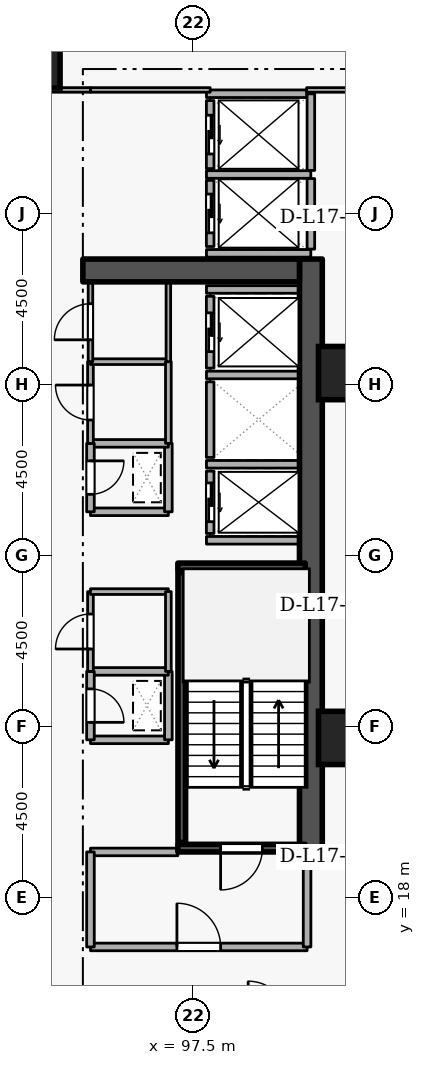
"""IFC4 building model, lengths in metres.
Left out: names, types, materials, properties, quantities, classifications, styles, units other than length and angle.
Written with IfcOpenShell. Run it as: python <this file> out.ifc"""

import sys

from ifc_helpers import new_model, si_unit, direction, frame, frame_2d, origin, origin_2d, place, context, subcontext, project, spatial, rectangle, extrude, element, fill, save


model = new_model("IFC4")
c1 = context("Model", 3, precision=1e-05, world=origin(), true_north=direction((0.0, 1.0)))
c2 = subcontext(c1, "Body", "Model", "MODEL_VIEW")
j1 = project(units=[si_unit("LENGTHUNIT", "METRE"), si_unit("PLANEANGLEUNIT", "RADIAN")], contexts=[c1])
p1 = place(None, origin())
s1 = spatial("IfcSite", under=j1, at=p1, CompositionType="ELEMENT")
p2 = place(p1, origin())
s2 = spatial("IfcBuilding", under=s1, at=p2, CompositionType="ELEMENT")
p3 = place(p2, frame((0.0, 0.0, 68.1)))
s3 = spatial("IfcBuildingStorey", under=s2, at=p3, CompositionType="ELEMENT", Elevation=68.1)
p4 = place(p3, frame((100.6, 19.2, 0.0), z_axis=(0.0, 0.0, 1.0), x_axis=(0.0, 1.0, 0.0)))
e1 = element("IfcWall", 1, at=p4, inside=s3, PredefinedType="SHEAR", context=c2, shape_type="SweptSolid", body=[
    extrude(rectangle(XDim=15.6, YDim=0.6, at=frame_2d((7.8, 0.0))), origin(), (0.0, 0.0, 1.0), 3.6),
])
p5 = place(p3, frame((94.6, 34.5, 0.0), z_axis=(0.0, 0.0, 1.0), x_axis=(1.0, 0.0, 0.0)))
e2 = element("IfcWall", 2, at=p5, inside=s3, PredefinedType="SHEAR", context=c2, shape_type="SweptSolid", body=[
    extrude(rectangle(XDim=5.7, YDim=0.6, at=frame_2d((2.85, 0.0))), origin(), (0.0, 0.0, 1.0), 3.6),
])
for number, where, z_axis, x_axis in (
    (3, (93.3, 40.0, 0.0), (0.0, 0.0, 1.0), (1.0, 0.0, 0.0)),
    (4, (101.5, 22.2, 0.0), (0.0, 0.0, 1.0), (1.0, 0.0, 0.0)),
    (5, (101.5, 31.8, 0.0), (0.0, 0.0, 1.0), (1.0, 0.0, 0.0)),
):
    element("IfcColumn", number, at=place(p3, frame(where, z_axis=z_axis, x_axis=x_axis)), inside=s3, PredefinedType="COLUMN", context=c2, shape_type="SweptSolid", body=[
        extrude(rectangle(XDim=1.4, YDim=1.4, at=origin_2d()), origin(), (0.0, 0.0, 1.0), 3.6),
    ])
p6 = place(p3, frame((97.95, 29.22, 0.0), z_axis=(0.0, 0.0, 1.0), x_axis=(0.0, -1.0, 0.0)))
e6 = element("IfcWall", 6, at=p6, inside=s3, PredefinedType="STANDARD", context=c2, shape_type="SweptSolid", body=[
    extrude(rectangle(XDim=1.64, YDim=0.2, at=frame_2d((0.82, 0.0))), origin(), (0.0, 0.0, 1.0), 3.26),
])
p7 = place(p6, frame((0.31, 0.0, 0.0)))
e7 = element("IfcOpeningElement", 7, at=p7, cuts=e6, PredefinedType="OPENING", context=c2, shape_type="SweptSolid", body=[
    extrude(rectangle(XDim=1.02, YDim=2.06, at=frame_2d((0.51, 1.03))), frame((0.0, 0.11, 0.0), z_axis=(0.0, -1.0, 0.0), x_axis=(1.0, 0.0, 0.0)), (0.0, 0.0, 1.0), 0.22),
])
p8 = place(p3, frame((97.95, 31.57, 0.0), z_axis=(0.0, 0.0, 1.0), x_axis=(0.0, -1.0, 0.0)))
e8 = element("IfcWall", 8, at=p8, inside=s3, PredefinedType="STANDARD", context=c2, shape_type="SweptSolid", body=[
    extrude(rectangle(XDim=1.99, YDim=0.2, at=frame_2d((0.995, 0.0))), origin(), (0.0, 0.0, 1.0), 3.26),
])
p9 = place(p3, frame((97.95, 33.82, 0.0), z_axis=(0.0, 0.0, 1.0), x_axis=(0.0, -1.0, 0.0)))
e9 = element("IfcWall", 9, at=p9, inside=s3, PredefinedType="STANDARD", context=c2, shape_type="SweptSolid", body=[
    extrude(rectangle(XDim=1.89, YDim=0.2, at=frame_2d((0.945, 0.0))), origin(), (0.0, 0.0, 1.0), 3.26),
])
p10 = place(p9, frame((0.435, 0.0, 0.0)))
e10 = element("IfcOpeningElement", 10, at=p10, cuts=e9, PredefinedType="OPENING", context=c2, shape_type="SweptSolid", body=[
    extrude(rectangle(XDim=1.02, YDim=2.06, at=frame_2d((0.51, 1.03))), frame((0.0, 0.11, 0.0), z_axis=(0.0, -1.0, 0.0), x_axis=(1.0, 0.0, 0.0)), (0.0, 0.0, 1.0), 0.22),
])
p11 = place(p3, frame((97.95, 36.87, 0.0), z_axis=(0.0, 0.0, 1.0), x_axis=(0.0, -1.0, 0.0)))
e11 = element("IfcWall", 11, at=p11, inside=s3, PredefinedType="STANDARD", context=c2, shape_type="SweptSolid", body=[
    extrude(rectangle(XDim=1.74, YDim=0.2, at=frame_2d((0.87, 0.0))), origin(), (0.0, 0.0, 1.0), 3.26),
])
p12 = place(p11, frame((0.36, 0.0, 0.0)))
e12 = element("IfcOpeningElement", 12, at=p12, cuts=e11, PredefinedType="OPENING", context=c2, shape_type="SweptSolid", body=[
    extrude(rectangle(XDim=1.02, YDim=2.06, at=frame_2d((0.51, 1.03))), frame((0.0, 0.11, 0.0), z_axis=(0.0, -1.0, 0.0), x_axis=(1.0, 0.0, 0.0)), (0.0, 0.0, 1.0), 0.22),
])
p13 = place(p3, frame((97.95, 38.97, 0.0), z_axis=(0.0, 0.0, 1.0), x_axis=(0.0, -1.0, 0.0)))
e13 = element("IfcWall", 13, at=p13, inside=s3, PredefinedType="STANDARD", context=c2, shape_type="SweptSolid", body=[
    extrude(rectangle(XDim=1.79, YDim=0.2, at=frame_2d((0.895, 0.0))), origin(), (0.0, 0.0, 1.0), 3.26),
])
p14 = place(p13, frame((0.385, 0.0, 0.0)))
e14 = element("IfcOpeningElement", 14, at=p14, cuts=e13, PredefinedType="OPENING", context=c2, shape_type="SweptSolid", body=[
    extrude(rectangle(XDim=1.02, YDim=2.06, at=frame_2d((0.51, 1.03))), frame((0.0, 0.11, 0.0), z_axis=(0.0, -1.0, 0.0), x_axis=(1.0, 0.0, 0.0)), (0.0, 0.0, 1.0), 0.22),
])
for number, where, z_axis, x_axis in (
    (15, (97.852, 29.4, 0.0), (0.0, 0.0, 1.0), (1.0, 0.0, 0.0)),
    (16, (97.852, 27.4, 0.0), (0.0, 0.0, 1.0), (1.0, 0.0, 0.0)),
    (17, (97.852, 31.75, 0.0), (0.0, 0.0, 1.0), (1.0, 0.0, 0.0)),
    (18, (97.852, 34.0, 0.0), (0.0, 0.0, 1.0), (1.0, 0.0, 0.0)),
):
    element("IfcWall", number, at=place(p3, frame(where, z_axis=z_axis, x_axis=x_axis)), inside=s3, PredefinedType="STANDARD", context=c2, shape_type="SweptSolid", body=[
        extrude(rectangle(XDim=2.436, YDim=0.2, at=frame_2d((1.218, 0.0))), origin(), (0.0, 0.0, 1.0), 3.26),
    ])
for number, where, z_axis, x_axis in (
    (19, (97.852, 37.025, 0.0), (0.0, 0.0, 1.0), (1.0, 0.0, 0.0)),
    (20, (97.852, 34.95, 0.0), (0.0, 0.0, 1.0), (1.0, 0.0, 0.0)),
):
    element("IfcWall", number, at=place(p3, frame(where, z_axis=z_axis, x_axis=x_axis)), inside=s3, PredefinedType="STANDARD", context=c2, shape_type="SweptSolid", body=[
        extrude(rectangle(XDim=2.746, YDim=0.2, at=frame_2d((1.373, 0.0))), origin(), (0.0, 0.0, 1.0), 3.26),
    ])
p15 = place(p3, frame((100.6, 35.062, 0.0), z_axis=(0.0, 0.0, 1.0), x_axis=(0.0, 1.0, 0.0)))
e21 = element("IfcWall", 21, at=p15, inside=s3, PredefinedType="STANDARD", context=c2, shape_type="SweptSolid", body=[
    extrude(rectangle(XDim=1.856, YDim=0.2, at=frame_2d((0.928, 0.0))), origin(), (0.0, 0.0, 1.0), 3.26),
])
p16 = place(p3, frame((100.6, 37.132, 0.0), z_axis=(0.0, 0.0, 1.0), x_axis=(0.0, 1.0, 0.0)))
e22 = element("IfcWall", 22, at=p16, inside=s3, PredefinedType="STANDARD", context=c2, shape_type="SweptSolid", body=[
    extrude(rectangle(XDim=2.016, YDim=0.2, at=frame_2d((1.008, 0.0))), origin(), (0.0, 0.0, 1.0), 3.26),
])
p17 = place(p3, frame((97.852, 39.15, 0.0), z_axis=(0.0, 0.0, 1.0), x_axis=(1.0, 0.0, 0.0)))
e23 = element("IfcWall", 23, at=p17, inside=s3, PredefinedType="STANDARD", context=c2, shape_type="SweptSolid", body=[
    extrude(rectangle(XDim=2.636, YDim=0.2, at=frame_2d((1.318, 0.0))), origin(), (0.0, 0.0, 1.0), 3.26),
])
p18 = place(p3, frame((100.45, 19.3, 0.0), z_axis=(0.0, 0.0, 1.0), x_axis=(-1.0, 0.0, 0.0)))
e24 = element("IfcWall", 24, at=p18, inside=s3, PredefinedType="SHEAR", context=c2, shape_type="SweptSolid", body=[
    extrude(rectangle(XDim=3.35, YDim=0.2, at=frame_2d((1.675, 0.0))), origin(), (0.0, 0.0, 1.0), 3.6),
])
p19 = place(p18, frame((1.125, 0.0, 0.0)))
e25 = element("IfcOpeningElement", 25, at=p19, cuts=e24, PredefinedType="OPENING", context=c2, shape_type="SweptSolid", body=[
    extrude(rectangle(XDim=1.1, YDim=2.1, at=frame_2d((0.55, 1.05))), frame((0.0, 0.11, 0.0), z_axis=(0.0, -1.0, 0.0), x_axis=(1.0, 0.0, 0.0)), (0.0, 0.0, 1.0), 0.22),
])
p20 = place(p3, frame((97.1, 26.7, 0.0), z_axis=(0.0, 0.0, 1.0), x_axis=(1.0, 0.0, 0.0)))
e26 = element("IfcWall", 26, at=p20, inside=s3, PredefinedType="SHEAR", context=c2, shape_type="SweptSolid", body=[
    extrude(rectangle(XDim=3.35, YDim=0.2, at=frame_2d((1.675, 0.0))), origin(), (0.0, 0.0, 1.0), 3.6),
])
p21 = place(p3, frame((97.203, 26.55, 0.0), z_axis=(0.0, 0.0, 1.0), x_axis=(0.0, -1.0, 0.0)))
e27 = element("IfcWall", 27, at=p21, inside=s3, PredefinedType="SHEAR", context=c2, shape_type="SweptSolid", body=[
    extrude(rectangle(XDim=7.1, YDim=0.2, at=frame_2d((3.55, 0.0))), origin(), (0.0, 0.0, 1.0), 3.6),
])
p22 = place(p3, frame((94.8, 16.7, 0.0), z_axis=(0.0, 0.0, 1.0), x_axis=(1.0, 0.0, 0.0)))
e28 = element("IfcWall", 28, at=p22, inside=s3, PredefinedType="STANDARD", context=c2, shape_type="SweptSolid", body=[
    extrude(rectangle(XDim=5.7, YDim=0.2, at=frame_2d((2.85, 0.0))), origin(), (0.0, 0.0, 1.0), 3.26),
])
p23 = place(p22, frame((2.275, 0.0, 0.0)))
e29 = element("IfcOpeningElement", 29, at=p23, cuts=e28, PredefinedType="OPENING", context=c2, shape_type="SweptSolid", body=[
    extrude(rectangle(XDim=1.15, YDim=2.1, at=frame_2d((0.575, 1.05))), frame((0.0, 0.11, 0.0), z_axis=(0.0, -1.0, 0.0), x_axis=(1.0, 0.0, 0.0)), (0.0, 0.0, 1.0), 0.22),
])
p24 = place(p3, frame((100.5, 16.7, 0.0), z_axis=(0.0, 0.0, 1.0), x_axis=(0.0, 1.0, 0.0)))
e30 = element("IfcWall", 30, at=p24, inside=s3, PredefinedType="STANDARD", context=c2, shape_type="SweptSolid", body=[
    extrude(rectangle(XDim=2.5, YDim=0.2, at=frame_2d((1.25, 0.0))), origin(), (0.0, 0.0, 1.0), 3.26),
])
p25 = place(p3, frame((97.1, 19.2, 0.0), z_axis=(0.0, 0.0, 1.0), x_axis=(-1.0, 0.0, 0.0)))
e31 = element("IfcWall", 31, at=p25, inside=s3, PredefinedType="STANDARD", context=c2, shape_type="SweptSolid", body=[
    extrude(rectangle(XDim=2.3, YDim=0.2, at=frame_2d((1.15, 0.0))), origin(), (0.0, 0.0, 1.0), 2.465),
])
p26 = place(p3, frame((94.8, 19.2, 0.0), z_axis=(0.0, 0.0, 1.0), x_axis=(0.0, -1.0, 0.0)))
e32 = element("IfcWall", 32, at=p26, inside=s3, PredefinedType="STANDARD", context=c2, shape_type="SweptSolid", body=[
    extrude(rectangle(XDim=2.5, YDim=0.2, at=frame_2d((1.25, 0.0))), origin(), (0.0, 0.0, 1.0), 3.26),
])
p27 = place(p3, frame((94.8, 28.15, 0.0), z_axis=(0.0, 0.0, 1.0), x_axis=(1.0, 0.0, 0.0)))
e33 = element("IfcWall", 33, at=p27, inside=s3, PredefinedType="STANDARD", context=c2, shape_type="SweptSolid", body=[
    extrude(rectangle(XDim=2.05, YDim=0.2, at=frame_2d((1.025, 0.0))), origin(), (0.0, 0.0, 1.0), 3.26),
])
p28 = place(p3, frame((96.85, 28.15, 0.0), z_axis=(0.0, 0.0, 1.0), x_axis=(0.0, 1.0, 0.0)))
e34 = element("IfcWall", 34, at=p28, inside=s3, PredefinedType="STANDARD", context=c2, shape_type="SweptSolid", body=[
    extrude(rectangle(XDim=1.8, YDim=0.2, at=frame_2d((0.9, 0.0))), origin(), (0.0, 0.0, 1.0), 3.26),
])
p29 = place(p3, frame((96.85, 29.95, 0.0), z_axis=(0.0, 0.0, 1.0), x_axis=(-1.0, 0.0, 0.0)))
e35 = element("IfcWall", 35, at=p29, inside=s3, PredefinedType="STANDARD", context=c2, shape_type="SweptSolid", body=[
    extrude(rectangle(XDim=2.05, YDim=0.2, at=frame_2d((1.025, 0.0))), origin(), (0.0, 0.0, 1.0), 3.26),
])
p30 = place(p3, frame((94.8, 29.95, 0.0), z_axis=(0.0, 0.0, 1.0), x_axis=(0.0, -1.0, 0.0)))
e36 = element("IfcWall", 36, at=p30, inside=s3, PredefinedType="STANDARD", context=c2, shape_type="SweptSolid", body=[
    extrude(rectangle(XDim=1.8, YDim=0.2, at=frame_2d((0.9, 0.0))), origin(), (0.0, 0.0, 1.0), 3.26),
])
p31 = place(p30, frame((0.46, 0.0, 0.0)))
e37 = element("IfcOpeningElement", 37, at=p31, cuts=e36, PredefinedType="OPENING", context=c2, shape_type="SweptSolid", body=[
    extrude(rectangle(XDim=0.88, YDim=2.04, at=frame_2d((0.44, 1.02))), frame((0.0, 0.11, 0.0), z_axis=(0.0, -1.0, 0.0), x_axis=(1.0, 0.0, 0.0)), (0.0, 0.0, 1.0), 0.22),
])
p32 = place(p3, frame((94.8, 22.15, 0.0), z_axis=(0.0, 0.0, 1.0), x_axis=(1.0, 0.0, 0.0)))
e38 = element("IfcWall", 38, at=p32, inside=s3, PredefinedType="STANDARD", context=c2, shape_type="SweptSolid", body=[
    extrude(rectangle(XDim=2.05, YDim=0.2, at=frame_2d((1.025, 0.0))), origin(), (0.0, 0.0, 1.0), 3.26),
])
p33 = place(p3, frame((96.85, 22.15, 0.0), z_axis=(0.0, 0.0, 1.0), x_axis=(0.0, 1.0, 0.0)))
e39 = element("IfcWall", 39, at=p33, inside=s3, PredefinedType="STANDARD", context=c2, shape_type="SweptSolid", body=[
    extrude(rectangle(XDim=1.8, YDim=0.2, at=frame_2d((0.9, 0.0))), origin(), (0.0, 0.0, 1.0), 3.26),
])
p34 = place(p3, frame((96.85, 23.95, 0.0), z_axis=(0.0, 0.0, 1.0), x_axis=(-1.0, 0.0, 0.0)))
e40 = element("IfcWall", 40, at=p34, inside=s3, PredefinedType="STANDARD", context=c2, shape_type="SweptSolid", body=[
    extrude(rectangle(XDim=2.05, YDim=0.2, at=frame_2d((1.025, 0.0))), origin(), (0.0, 0.0, 1.0), 3.26),
])
p35 = place(p3, frame((94.8, 23.95, 0.0), z_axis=(0.0, 0.0, 1.0), x_axis=(0.0, -1.0, 0.0)))
e41 = element("IfcWall", 41, at=p35, inside=s3, PredefinedType="STANDARD", context=c2, shape_type="SweptSolid", body=[
    extrude(rectangle(XDim=1.8, YDim=0.2, at=frame_2d((0.9, 0.0))), origin(), (0.0, 0.0, 1.0), 3.26),
])
p36 = place(p35, frame((0.46, 0.0, 0.0)))
e42 = element("IfcOpeningElement", 42, at=p36, cuts=e41, PredefinedType="OPENING", context=c2, shape_type="SweptSolid", body=[
    extrude(rectangle(XDim=0.88, YDim=2.04, at=frame_2d((0.44, 1.02))), frame((0.0, 0.11, 0.0), z_axis=(0.0, -1.0, 0.0), x_axis=(1.0, 0.0, 0.0)), (0.0, 0.0, 1.0), 0.22),
])
p37 = place(p3, frame((94.8, 23.95, 0.0), z_axis=(0.0, 0.0, 1.0), x_axis=(0.0, 1.0, 0.0)))
e43 = element("IfcWall", 43, at=p37, inside=s3, PredefinedType="PARTITIONING", context=c2, shape_type="SweptSolid", body=[
    extrude(rectangle(XDim=2.1, YDim=0.15, at=frame_2d((1.05, 0.0))), origin(), (0.0, 0.0, 1.0), 3.26),
])
p38 = place(p37, frame((0.59, 0.0, 0.0)))
e44 = element("IfcOpeningElement", 44, at=p38, cuts=e43, PredefinedType="OPENING", context=c2, shape_type="SweptSolid", body=[
    extrude(rectangle(XDim=0.92, YDim=2.08, at=frame_2d((0.46, 1.04))), frame((0.0, 0.085, 0.0), z_axis=(0.0, -1.0, 0.0), x_axis=(1.0, 0.0, 0.0)), (0.0, 0.0, 1.0), 0.17),
])
p39 = place(p3, frame((94.8, 26.05, 0.0), z_axis=(0.0, 0.0, 1.0), x_axis=(1.0, 0.0, 0.0)))
e45 = element("IfcWall", 45, at=p39, inside=s3, PredefinedType="PARTITIONING", context=c2, shape_type="SweptSolid", body=[
    extrude(rectangle(XDim=2.05, YDim=0.15, at=frame_2d((1.025, 0.0))), origin(), (0.0, 0.0, 1.0), 3.26),
])
p40 = place(p3, frame((96.85, 26.05, 0.0), z_axis=(0.0, 0.0, 1.0), x_axis=(0.0, -1.0, 0.0)))
e46 = element("IfcWall", 46, at=p40, inside=s3, PredefinedType="PARTITIONING", context=c2, shape_type="SweptSolid", body=[
    extrude(rectangle(XDim=2.1, YDim=0.15, at=frame_2d((1.05, 0.0))), origin(), (0.0, 0.0, 1.0), 3.26),
])
p41 = place(p3, frame((94.8, 29.95, 0.0), z_axis=(0.0, 0.0, 1.0), x_axis=(0.0, 1.0, 0.0)))
e47 = element("IfcWall", 47, at=p41, inside=s3, PredefinedType="PARTITIONING", context=c2, shape_type="SweptSolid", body=[
    extrude(rectangle(XDim=2.15, YDim=0.15, at=frame_2d((1.075, 0.0))), origin(), (0.0, 0.0, 1.0), 3.26),
])
p42 = place(p41, frame((0.615, 0.0, 0.0)))
e48 = element("IfcOpeningElement", 48, at=p42, cuts=e47, PredefinedType="OPENING", context=c2, shape_type="SweptSolid", body=[
    extrude(rectangle(XDim=0.92, YDim=2.08, at=frame_2d((0.46, 1.04))), frame((0.0, 0.085, 0.0), z_axis=(0.0, -1.0, 0.0), x_axis=(1.0, 0.0, 0.0)), (0.0, 0.0, 1.0), 0.17),
])
p43 = place(p3, frame((94.8, 32.1, 0.0), z_axis=(0.0, 0.0, 1.0), x_axis=(1.0, 0.0, 0.0)))
e49 = element("IfcWall", 49, at=p43, inside=s3, PredefinedType="PARTITIONING", context=c2, shape_type="SweptSolid", body=[
    extrude(rectangle(XDim=2.05, YDim=0.15, at=frame_2d((1.025, 0.0))), origin(), (0.0, 0.0, 1.0), 3.26),
])
p44 = place(p3, frame((96.85, 32.1, 0.0), z_axis=(0.0, 0.0, 1.0), x_axis=(0.0, -1.0, 0.0)))
e50 = element("IfcWall", 50, at=p44, inside=s3, PredefinedType="PARTITIONING", context=c2, shape_type="SweptSolid", body=[
    extrude(rectangle(XDim=2.15, YDim=0.15, at=frame_2d((1.075, 0.0))), origin(), (0.0, 0.0, 1.0), 3.26),
])
p45 = place(p3, frame((94.8, 32.1, 0.0), z_axis=(0.0, 0.0, 1.0), x_axis=(0.0, 1.0, 0.0)))
e51 = element("IfcWall", 51, at=p45, inside=s3, PredefinedType="PARTITIONING", context=c2, shape_type="SweptSolid", body=[
    extrude(rectangle(XDim=2.1, YDim=0.12, at=frame_2d((1.05, 0.0))), origin(), (0.0, 0.0, 1.0), 3.26),
])
p46 = place(p45, frame((0.575, 0.0, 0.0)))
e52 = element("IfcOpeningElement", 52, at=p46, cuts=e51, PredefinedType="OPENING", context=c2, shape_type="SweptSolid", body=[
    extrude(rectangle(XDim=0.95, YDim=2.1, at=frame_2d((0.475, 1.05))), frame((0.0, 0.07, 0.0), z_axis=(0.0, -1.0, 0.0), x_axis=(1.0, 0.0, 0.0)), (0.0, 0.0, 1.0), 0.14),
])
p47 = place(p3, frame((96.85, 34.2, 0.0), z_axis=(0.0, 0.0, 1.0), x_axis=(0.0, -1.0, 0.0)))
e53 = element("IfcWall", 53, at=p47, inside=s3, PredefinedType="PARTITIONING", context=c2, shape_type="SweptSolid", body=[
    extrude(rectangle(XDim=2.1, YDim=0.12, at=frame_2d((1.05, 0.0))), origin(), (0.0, 0.0, 1.0), 3.26),
])
p48 = place(p3, frame((97.95, 39.25, 0.0), z_axis=(0.0, 0.0, 1.0), x_axis=(-1.0, 0.0, 0.0)))
e54 = element("IfcWall", 54, at=p48, inside=s3, PredefinedType="PARTITIONING", context=c2, shape_type="SweptSolid", body=[
    extrude(rectangle(XDim=3.15, YDim=0.12, at=frame_2d((1.575, 0.0))), origin(), (0.0, 0.0, 1.0), 3.26),
])
p49 = place(p3, frame((94.8, 39.25, 0.0), z_axis=(0.0, 0.0, 1.0), x_axis=(-1.0, 0.0, 0.0)))
e55 = element("IfcWall", 55, at=p49, inside=s3, PredefinedType="PARTITIONING", context=c2, shape_type="SweptSolid", body=[
    extrude(rectangle(XDim=1.85, YDim=0.12, at=frame_2d((0.925, 0.0))), origin(), (0.0, 0.0, 1.0), 3.26),
])
p50 = place(p3, frame((102.35, 39.25, 0.0), z_axis=(0.0, 0.0, 1.0), x_axis=(-1.0, 0.0, 0.0)))
e56 = element("IfcWall", 56, at=p50, inside=s3, PredefinedType="PARTITIONING", context=c2, shape_type="SweptSolid", body=[
    extrude(rectangle(XDim=1.862, YDim=0.12, at=frame_2d((0.931, 0.0))), origin(), (0.0, 0.0, 1.0), 3.26),
])
p51 = place(p7, origin())
e57 = element("IfcDoor", 57, at=p51, inside=s3, OperationType="SLIDING_TO_LEFT", PredefinedType="DOOR", context=c2, shape_type="SweptSolid", body=[
    extrude(rectangle(XDim=1.02, YDim=2.06, at=frame_2d((0.51, 1.03))), frame((0.0, 0.025, 0.0), z_axis=(0.0, -1.0, 0.0), x_axis=(1.0, 0.0, 0.0)), (0.0, 0.0, 1.0), 0.05),
])
fill(e7, e57)
p52 = place(p10, origin())
e58 = element("IfcDoor", 58, at=p52, inside=s3, OperationType="SLIDING_TO_LEFT", PredefinedType="DOOR", context=c2, shape_type="SweptSolid", body=[
    extrude(rectangle(XDim=1.02, YDim=2.06, at=frame_2d((0.51, 1.03))), frame((0.0, 0.025, 0.0), z_axis=(0.0, -1.0, 0.0), x_axis=(1.0, 0.0, 0.0)), (0.0, 0.0, 1.0), 0.05),
])
fill(e10, e58)
p53 = place(p12, origin())
e59 = element("IfcDoor", 59, at=p53, inside=s3, OperationType="SLIDING_TO_LEFT", PredefinedType="DOOR", context=c2, shape_type="SweptSolid", body=[
    extrude(rectangle(XDim=1.02, YDim=2.06, at=frame_2d((0.51, 1.03))), frame((0.0, 0.025, 0.0), z_axis=(0.0, -1.0, 0.0), x_axis=(1.0, 0.0, 0.0)), (0.0, 0.0, 1.0), 0.05),
])
fill(e12, e59)
p54 = place(p14, origin())
e60 = element("IfcDoor", 60, at=p54, inside=s3, OperationType="SLIDING_TO_LEFT", PredefinedType="DOOR", context=c2, shape_type="SweptSolid", body=[
    extrude(rectangle(XDim=1.02, YDim=2.06, at=frame_2d((0.51, 1.03))), frame((0.0, 0.025, 0.0), z_axis=(0.0, -1.0, 0.0), x_axis=(1.0, 0.0, 0.0)), (0.0, 0.0, 1.0), 0.05),
])
fill(e14, e60)
p55 = place(p19, origin())
e61 = element("IfcDoor", 61, at=p55, inside=s3, OperationType="SINGLE_SWING_RIGHT", PredefinedType="DOOR", context=c2, shape_type="SweptSolid", body=[
    extrude(rectangle(XDim=1.1, YDim=2.1, at=frame_2d((0.55, 1.05))), frame((0.0, 0.025, 0.0), z_axis=(0.0, -1.0, 0.0), x_axis=(1.0, 0.0, 0.0)), (0.0, 0.0, 1.0), 0.05),
])
fill(e25, e61)
p56 = place(p23, origin())
e62 = element("IfcDoor", 62, at=p56, inside=s3, OperationType="SINGLE_SWING_LEFT", PredefinedType="DOOR", context=c2, shape_type="SweptSolid", body=[
    extrude(rectangle(XDim=1.15, YDim=2.1, at=frame_2d((0.575, 1.05))), frame((0.0, 0.025, 0.0), z_axis=(0.0, -1.0, 0.0), x_axis=(1.0, 0.0, 0.0)), (0.0, 0.0, 1.0), 0.05),
])
fill(e29, e62)
p57 = place(p31, origin())
e63 = element("IfcDoor", 63, at=p57, inside=s3, OperationType="SINGLE_SWING_LEFT", PredefinedType="DOOR", context=c2, shape_type="SweptSolid", body=[
    extrude(rectangle(XDim=0.88, YDim=2.04, at=frame_2d((0.44, 1.02))), frame((0.0, 0.025, 0.0), z_axis=(0.0, -1.0, 0.0), x_axis=(1.0, 0.0, 0.0)), (0.0, 0.0, 1.0), 0.05),
])
fill(e37, e63)
p58 = place(p36, origin())
e64 = element("IfcDoor", 64, at=p58, inside=s3, OperationType="SINGLE_SWING_RIGHT", PredefinedType="DOOR", context=c2, shape_type="SweptSolid", body=[
    extrude(rectangle(XDim=0.88, YDim=2.04, at=frame_2d((0.44, 1.02))), frame((0.0, 0.025, 0.0), z_axis=(0.0, -1.0, 0.0), x_axis=(1.0, 0.0, 0.0)), (0.0, 0.0, 1.0), 0.05),
])
fill(e42, e64)
p59 = place(p38, origin())
e65 = element("IfcDoor", 65, at=p59, inside=s3, OperationType="SINGLE_SWING_LEFT", PredefinedType="DOOR", context=c2, shape_type="SweptSolid", body=[
    extrude(rectangle(XDim=0.92, YDim=2.08, at=frame_2d((0.46, 1.04))), frame((0.0, 0.025, 0.0), z_axis=(0.0, -1.0, 0.0), x_axis=(1.0, 0.0, 0.0)), (0.0, 0.0, 1.0), 0.05),
])
fill(e44, e65)
p60 = place(p42, origin())
e66 = element("IfcDoor", 66, at=p60, inside=s3, OperationType="SINGLE_SWING_RIGHT", PredefinedType="DOOR", context=c2, shape_type="SweptSolid", body=[
    extrude(rectangle(XDim=0.92, YDim=2.08, at=frame_2d((0.46, 1.04))), frame((0.0, 0.025, 0.0), z_axis=(0.0, -1.0, 0.0), x_axis=(1.0, 0.0, 0.0)), (0.0, 0.0, 1.0), 0.05),
])
fill(e48, e66)
p61 = place(p46, origin())
e67 = element("IfcDoor", 67, at=p61, inside=s3, OperationType="SINGLE_SWING_LEFT", PredefinedType="DOOR", context=c2, shape_type="SweptSolid", body=[
    extrude(rectangle(XDim=0.95, YDim=2.1, at=frame_2d((0.475, 1.05))), frame((0.0, 0.025, 0.0), z_axis=(0.0, -1.0, 0.0), x_axis=(1.0, 0.0, 0.0)), (0.0, 0.0, 1.0), 0.05),
])
fill(e52, e67)
save(model, sys.argv[1])
